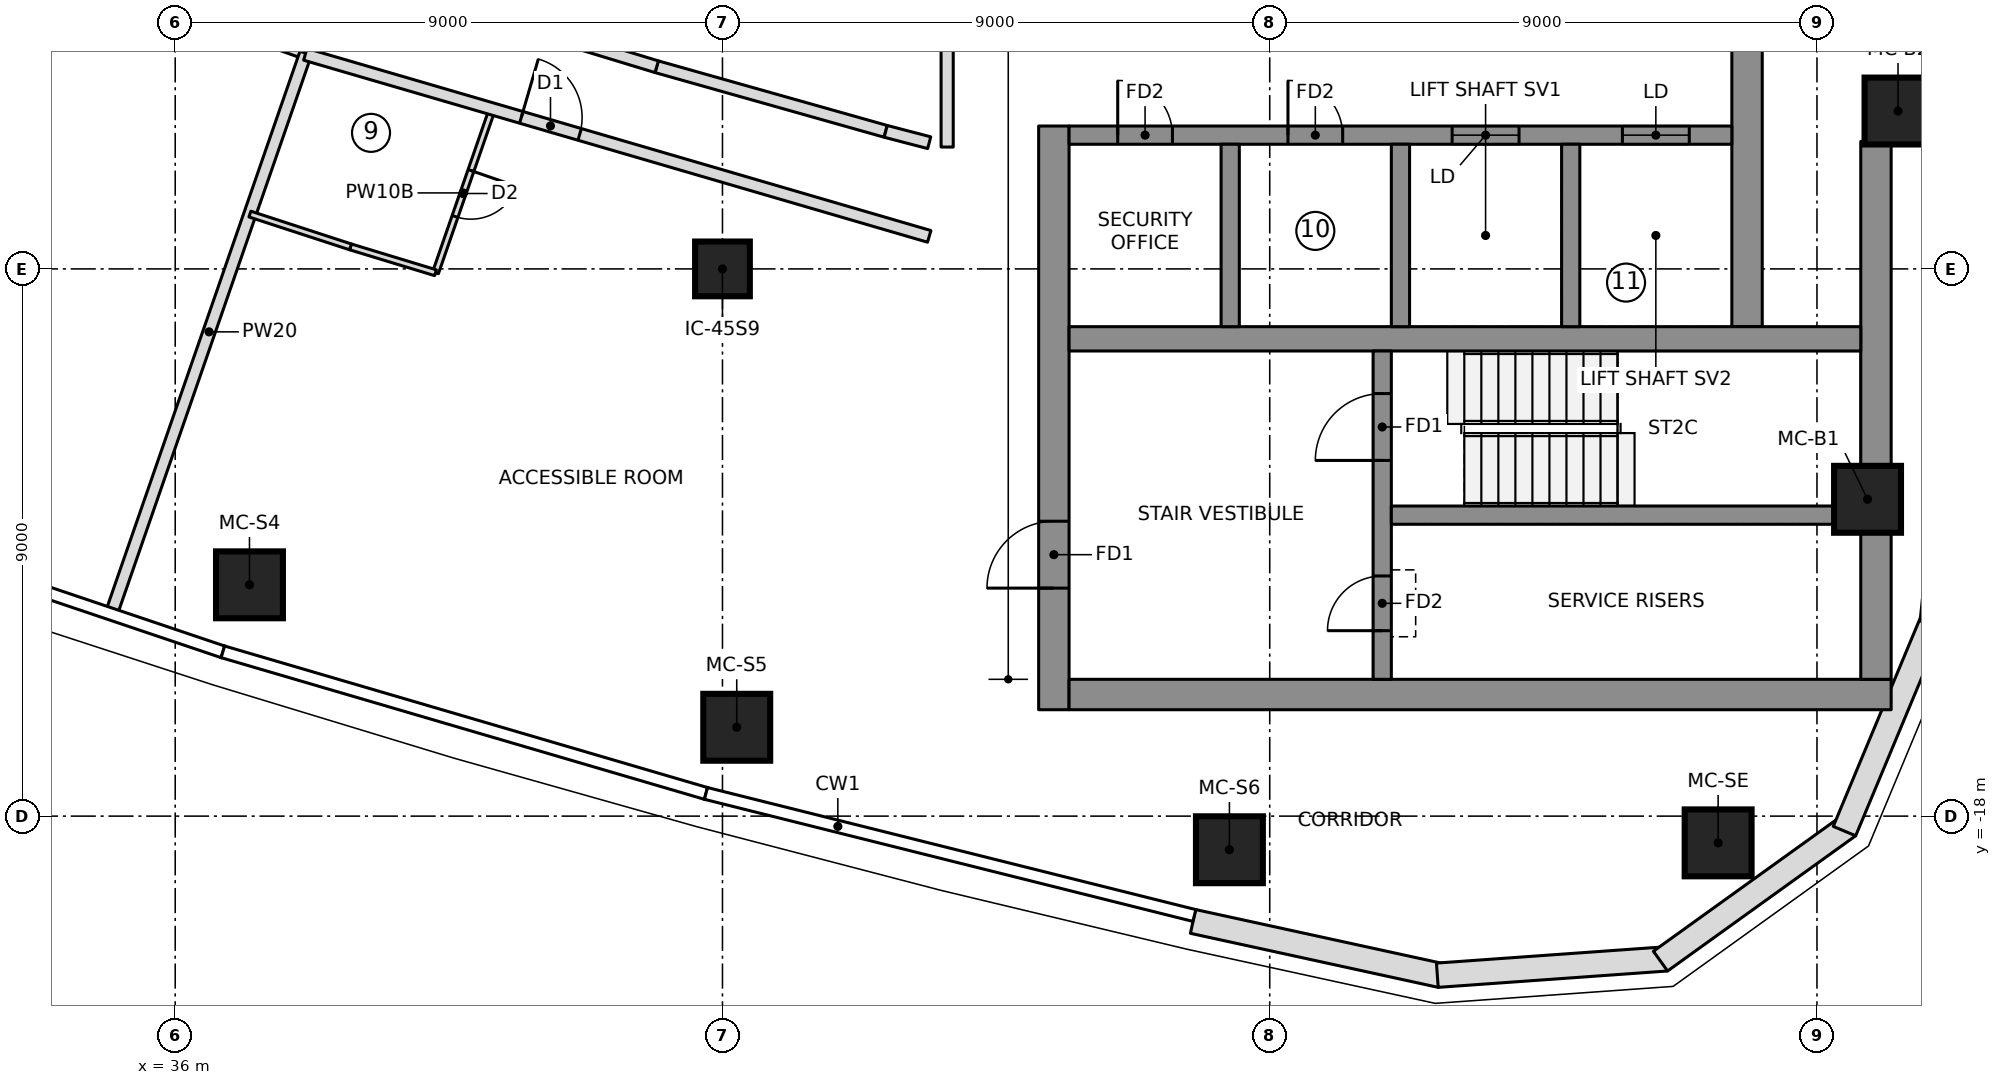
"""IFC4 building model, lengths in metres.
Left out: names, types, materials, properties, quantities, classifications, styles, units other than length and angle.
Written with IfcOpenShell. Run it as: python <this file> out.ifc"""

import sys

from ifc_helpers import new_model, si_unit, direction, frame, frame_2d, origin, origin_2d, place, context, subcontext, project, spatial, polyline, rectangle, outline, extrude, element, fill, save


model = new_model("IFC4")
c1 = context("Model", 3, precision=1e-05, world=origin(), true_north=direction((0.0, 1.0)))
c2 = subcontext(c1, "Body", "Model", "MODEL_VIEW")
j1 = project(units=[si_unit("LENGTHUNIT", "METRE"), si_unit("PLANEANGLEUNIT", "RADIAN")], contexts=[c1])
p1 = place(None, origin())
s1 = spatial("IfcSite", under=j1, at=p1, CompositionType="ELEMENT")
p2 = place(p1, origin())
s2 = spatial("IfcBuilding", under=s1, at=p2, CompositionType="ELEMENT")
p3 = place(p2, frame((0.0, 0.0, 278.55)))
s3 = spatial("IfcBuildingStorey", under=s2, at=p3, CompositionType="ELEMENT", Elevation=278.55)
p4 = place(p3, frame((50.45, -16.25, 0.0), z_axis=(0.0, 0.0, 1.0), x_axis=(0.0, 1.0, 0.0)))
e1 = element("IfcWall", 1, at=p4, inside=s3, PredefinedType="SHEAR", context=c2, shape_type="SweptSolid", body=[
    extrude(rectangle(XDim=9.6, YDim=0.5, at=frame_2d((4.8, 0.0))), origin(), (0.0, 0.0, 1.0), 3.55),
])
p5 = place(p4, frame((2.0, 0.0, 0.0)))
e2 = element("IfcOpeningElement", 2, at=p5, cuts=e1, PredefinedType="OPENING", context=c2, shape_type="SweptSolid", body=[
    extrude(rectangle(XDim=1.1, YDim=2.1, at=frame_2d((0.55, 1.05))), frame((0.0, 0.26, 0.0), z_axis=(0.0, -1.0, 0.0), x_axis=(1.0, 0.0, 0.0)), (0.0, 0.0, 1.0), 0.52),
])
p6 = place(p3, frame((50.7, -16.0, 0.0), z_axis=(0.0, 0.0, 1.0), x_axis=(1.0, 0.0, 0.0)))
e3 = element("IfcWall", 3, at=p6, inside=s3, PredefinedType="SHEAR", context=c2, shape_type="SweptSolid", body=[
    extrude(rectangle(XDim=13.52, YDim=0.5, at=frame_2d((6.76, 0.0))), origin(), (0.0, 0.0, 1.0), 3.55),
])
p7 = place(p3, frame((63.97, -15.75, 0.0), z_axis=(0.0, 0.0, 1.0), x_axis=(0.0, 1.0, 0.0)))
e4 = element("IfcWall", 4, at=p7, inside=s3, PredefinedType="SHEAR", context=c2, shape_type="SweptSolid", body=[
    extrude(rectangle(XDim=8.847, YDim=0.5, at=frame_2d((4.423, 0.0))), origin(), (0.0, 0.0, 1.0), 3.55),
])
p8 = place(p3, frame((61.85, -9.95, 0.0), z_axis=(0.0, 0.0, 1.0), x_axis=(0.0, 1.0, 0.0)))
e5 = element("IfcWall", 5, at=p8, inside=s3, PredefinedType="SHEAR", context=c2, shape_type="SweptSolid", body=[
    extrude(rectangle(XDim=19.9, YDim=0.5, at=frame_2d((9.95, 0.0))), origin(), (0.0, 0.0, 1.0), 3.55),
])
p9 = place(p3, frame((50.7, -10.15, 0.0), z_axis=(0.0, 0.0, 1.0), x_axis=(1.0, 0.0, 0.0)))
e6 = element("IfcWall", 6, at=p9, inside=s3, PredefinedType="SHEAR", context=c2, shape_type="SweptSolid", body=[
    extrude(rectangle(XDim=13.02, YDim=0.4, at=frame_2d((6.51, 0.0))), origin(), (0.0, 0.0, 1.0), 3.55),
])
p10 = place(p3, frame((50.7, -6.8, 0.0), z_axis=(0.0, 0.0, 1.0), x_axis=(1.0, 0.0, 0.0)))
e7 = element("IfcWall", 7, at=p10, inside=s3, PredefinedType="SHEAR", context=c2, shape_type="SweptSolid", body=[
    extrude(rectangle(XDim=10.9, YDim=0.3, at=frame_2d((5.45, 0.0))), origin(), (0.0, 0.0, 1.0), 3.55),
])
p11 = place(p10, frame((6.3, 0.0, 0.0)))
e8 = element("IfcOpeningElement", 8, at=p11, cuts=e7, PredefinedType="OPENING", context=c2, shape_type="SweptSolid", body=[
    extrude(rectangle(XDim=1.1, YDim=2.1, at=frame_2d((0.55, 1.05))), frame((0.0, 0.16, 0.0), z_axis=(0.0, -1.0, 0.0), x_axis=(1.0, 0.0, 0.0)), (0.0, 0.0, 1.0), 0.32),
])
p12 = place(p10, frame((9.1, 0.0, 0.0)))
e9 = element("IfcOpeningElement", 9, at=p12, cuts=e7, PredefinedType="OPENING", context=c2, shape_type="SweptSolid", body=[
    extrude(rectangle(XDim=1.1, YDim=2.1, at=frame_2d((0.55, 1.05))), frame((0.0, 0.16, 0.0), z_axis=(0.0, -1.0, 0.0), x_axis=(1.0, 0.0, 0.0)), (0.0, 0.0, 1.0), 0.32),
])
p13 = place(p10, frame((0.8, 0.0, 0.0)))
e10 = element("IfcOpeningElement", 10, at=p13, cuts=e7, PredefinedType="OPENING", context=c2, shape_type="SweptSolid", body=[
    extrude(rectangle(XDim=0.9, YDim=2.1, at=frame_2d((0.45, 1.05))), frame((0.0, 0.16, 0.0), z_axis=(0.0, -1.0, 0.0), x_axis=(1.0, 0.0, 0.0)), (0.0, 0.0, 1.0), 0.32),
])
p14 = place(p10, frame((3.6, 0.0, 0.0)))
e11 = element("IfcOpeningElement", 11, at=p14, cuts=e7, PredefinedType="OPENING", context=c2, shape_type="SweptSolid", body=[
    extrude(rectangle(XDim=0.9, YDim=2.1, at=frame_2d((0.45, 1.05))), frame((0.0, 0.16, 0.0), z_axis=(0.0, -1.0, 0.0), x_axis=(1.0, 0.0, 0.0)), (0.0, 0.0, 1.0), 0.32),
])
for number, where, z_axis, x_axis in (
    (12, (53.35, -9.95, 0.0), (0.0, 0.0, 1.0), (0.0, 1.0, 0.0)),
    (13, (56.15, -9.95, 0.0), (0.0, 0.0, 1.0), (0.0, 1.0, 0.0)),
    (14, (58.95, -9.95, 0.0), (0.0, 0.0, 1.0), (0.0, 1.0, 0.0)),
):
    element("IfcWall", number, at=place(p3, frame(where, z_axis=z_axis, x_axis=x_axis)), inside=s3, PredefinedType="SHEAR", context=c2, shape_type="SweptSolid", body=[
        extrude(rectangle(XDim=3.0, YDim=0.3, at=frame_2d((1.5, 0.0))), origin(), (0.0, 0.0, 1.0), 3.55),
    ])
p15 = place(p3, frame((55.85, -15.75, 0.0), z_axis=(0.0, 0.0, 1.0), x_axis=(0.0, 1.0, 0.0)))
e15 = element("IfcWall", 15, at=p15, inside=s3, PredefinedType="SHEAR", context=c2, shape_type="SweptSolid", body=[
    extrude(rectangle(XDim=5.4, YDim=0.3, at=frame_2d((2.7, 0.0))), origin(), (0.0, 0.0, 1.0), 3.55),
])
p16 = place(p15, frame((3.6, 0.0, 0.0)))
e16 = element("IfcOpeningElement", 16, at=p16, cuts=e15, PredefinedType="OPENING", context=c2, shape_type="SweptSolid", body=[
    extrude(rectangle(XDim=1.1, YDim=2.1, at=frame_2d((0.55, 1.05))), frame((0.0, 0.16, 0.0), z_axis=(0.0, -1.0, 0.0), x_axis=(1.0, 0.0, 0.0)), (0.0, 0.0, 1.0), 0.32),
])
p17 = place(p15, frame((0.8, 0.0, 0.0)))
e17 = element("IfcOpeningElement", 17, at=p17, cuts=e15, PredefinedType="OPENING", context=c2, shape_type="SweptSolid", body=[
    extrude(rectangle(XDim=0.9, YDim=2.1, at=frame_2d((0.45, 1.05))), frame((0.0, 0.16, 0.0), z_axis=(0.0, -1.0, 0.0), x_axis=(1.0, 0.0, 0.0)), (0.0, 0.0, 1.0), 0.32),
])
p18 = place(p3, frame((56.0, -13.05, 0.0), z_axis=(0.0, 0.0, 1.0), x_axis=(1.0, 0.0, 0.0)))
e18 = element("IfcWall", 18, at=p18, inside=s3, PredefinedType="SHEAR", context=c2, shape_type="SweptSolid", body=[
    extrude(rectangle(XDim=7.72, YDim=0.3, at=frame_2d((3.86, 0.0))), origin(), (0.0, 0.0, 1.0), 3.55),
])
for number, where, z_axis, x_axis in (
    (19, (37.221, -14.196, 0.0), (0.0, 0.0, 1.0), (1.0, 0.0, 0.0)),
    (20, (45.235, -16.539, 0.0), (0.0, 0.0, 1.0), (1.0, 0.0, 0.0)),
    (21, (53.337, -18.553, 0.0), (0.0, 0.0, 1.0), (1.0, 0.0, 0.0)),
    (22, (61.374, -18.44, 0.0), (0.0, 0.0, 1.0), (1.0, 0.0, 0.0)),
    (23, (63.832, -12.789, 0.0), (0.0, 0.0, 1.0), (1.0, 0.0, 0.0)),
    (24, (64.333, -6.403, 0.0), (0.0, 0.0, 1.0), (1.0, 0.0, 0.0)),
):
    element("IfcColumn", number, at=place(p3, frame(where, z_axis=z_axis, x_axis=x_axis)), inside=s3, PredefinedType="COLUMN", context=c2, shape_type="SweptSolid", body=[
        extrude(rectangle(XDim=1.1, YDim=1.1, at=origin_2d()), origin(), (0.0, 0.0, 1.0), 3.55),
    ])
p19 = place(p3, frame((45.0, -9.0, 0.0), z_axis=(0.0, 0.0, 1.0), x_axis=(1.0, 0.0, 0.0)))
e25 = element("IfcColumn", 25, at=p19, inside=s3, PredefinedType="COLUMN", context=c2, shape_type="SweptSolid", body=[
    extrude(rectangle(XDim=0.9, YDim=0.9, at=origin_2d()), origin(), (0.0, 0.0, 1.0), 3.55),
])
p20 = place(p3, frame((52.738, -19.732, 0.0), z_axis=(0.0, 0.0, 1.0), x_axis=(0.977020225348, -0.213146614471, 0.0)))
e26 = element("IfcWall", 26, at=p20, inside=s3, PredefinedType="NOTDEFINED", context=c2, shape_type="SweptSolid", body=[
    extrude(outline(polyline([(0.0, -0.2), (4.171, -0.2), (4.113, 0.2), (0.0, 0.2), (0.0, -0.2)])), origin(), (0.0, 0.0, 1.0), 3.25),
])
p21 = place(p3, frame((56.785, -20.615, 0.0), z_axis=(0.0, 0.0, 1.0), x_axis=(0.99746272096, 0.071190731806, 0.0)))
e27 = element("IfcWall", 27, at=p21, inside=s3, PredefinedType="NOTDEFINED", context=c2, shape_type="SweptSolid", body=[
    extrude(outline(polyline([(-0.029, -0.2), (3.753, -0.2), (3.64, 0.2), (0.029, 0.2), (-0.029, -0.2)])), origin(), (0.0, 0.0, 1.0), 3.25),
])
p22 = place(p3, frame((60.472, -20.352, 0.0), z_axis=(0.0, 0.0, 1.0), x_axis=(0.811962548682, 0.583709533533, 0.0)))
e28 = element("IfcWall", 28, at=p22, inside=s3, PredefinedType="NOTDEFINED", context=c2, shape_type="SweptSolid", body=[
    extrude(outline(polyline([(-0.057, -0.2), (3.753, -0.2), (3.64, 0.2), (0.057, 0.2), (-0.057, -0.2)])), origin(), (0.0, 0.0, 1.0), 3.25),
])
p23 = place(p3, frame((63.474, -18.194, 0.0), z_axis=(0.0, 0.0, 1.0), x_axis=(0.385285857918, 0.922797273343, 0.0)))
e29 = element("IfcWall", 29, at=p23, inside=s3, PredefinedType="NOTDEFINED", context=c2, shape_type="SweptSolid", body=[
    extrude(outline(polyline([(-0.057, -0.2), (3.726, -0.2), (3.667, 0.2), (0.057, 0.2), (-0.057, -0.2)])), origin(), (0.0, 0.0, 1.0), 3.25),
])
p24 = place(p3, frame((64.898, -14.782, 0.0), z_axis=(0.0, 0.0, 1.0), x_axis=(0.102249826987, 0.994758751096, 0.0)))
e30 = element("IfcWall", 30, at=p24, inside=s3, PredefinedType="NOTDEFINED", context=c2, shape_type="SweptSolid", body=[
    extrude(outline(polyline([(-0.03, -0.2), (4.237, -0.2), (4.23, 0.2), (0.03, 0.2), (-0.03, -0.2)])), origin(), (0.0, 0.0, 1.0), 3.25),
])
p25 = place(p3, frame((26.85, -1.423, 0.0), z_axis=(0.0, 0.0, 1.0), x_axis=(0.941868496397, -0.335981748753, 0.0)))
e31 = element("IfcWall", 31, at=p25, inside=s3, PredefinedType="PARTITIONING", context=c2, shape_type="SweptSolid", body=[
    extrude(rectangle(XDim=11.993, YDim=0.2, at=frame_2d((5.997, 0.0))), origin(), (0.0, 0.0, 1.0), 3.25),
])
p26 = place(p25, frame((3.05, 0.0, 0.0)))
e32 = element("IfcOpeningElement", 32, at=p26, cuts=e31, PredefinedType="OPENING", context=c2, shape_type="SweptSolid", body=[
    extrude(rectangle(XDim=1.0, YDim=2.1, at=frame_2d((0.5, 1.05))), frame((0.0, 0.11, 0.0), z_axis=(0.0, -1.0, 0.0), x_axis=(1.0, 0.0, 0.0)), (0.0, 0.0, 1.0), 0.22),
])
p27 = place(p3, frame((34.967, -14.618, 0.0), z_axis=(0.0, 0.0, 1.0), x_axis=(0.327725028322, 0.94477315045, 0.0)))
e33 = element("IfcWall", 33, at=p27, inside=s3, PredefinedType="PARTITIONING", context=c2, shape_type="SweptSolid", body=[
    extrude(rectangle(XDim=9.702, YDim=0.2, at=frame_2d((4.851, 0.0))), origin(), (0.0, 0.0, 1.0), 3.25),
])
p28 = place(p3, frame((41.192, -6.437, 0.0), z_axis=(0.0, 0.0, 1.0), x_axis=(-0.327695885805, -0.944783258968, 0.0)))
e34 = element("IfcWall", 34, at=p28, inside=s3, PredefinedType="PARTITIONING", context=c2, shape_type="SweptSolid", body=[
    extrude(rectangle(XDim=2.779, YDim=0.1, at=frame_2d((1.39, 0.0))), origin(), (0.0, 0.0, 1.0), 3.25),
])
p29 = place(p28, frame((1.0, 0.0, 0.0)))
e35 = element("IfcOpeningElement", 35, at=p29, cuts=e34, PredefinedType="OPENING", context=c2, shape_type="SweptSolid", body=[
    extrude(rectangle(XDim=0.8, YDim=2.1, at=frame_2d((0.4, 1.05))), frame((0.0, 0.06, 0.0), z_axis=(0.0, -1.0, 0.0), x_axis=(1.0, 0.0, 0.0)), (0.0, 0.0, 1.0), 0.12),
])
p30 = place(p3, frame((40.281, -9.063, 0.0), z_axis=(0.0, 0.0, 1.0), x_axis=(-0.956734544447, 0.290962216555, 0.0)))
e36 = element("IfcWall", 36, at=p30, inside=s3, PredefinedType="PARTITIONING", context=c2, shape_type="SweptSolid", body=[
    extrude(rectangle(XDim=1.462, YDim=0.1, at=frame_2d((0.731, 0.0))), origin(), (0.0, 0.0, 1.0), 3.25),
])
p31 = place(p3, frame((38.882, -8.638, 0.0), z_axis=(0.0, 0.0, 1.0), x_axis=(-0.950684866901, 0.31015848182, 0.0)))
e37 = element("IfcWall", 37, at=p31, inside=s3, PredefinedType="PARTITIONING", context=c2, shape_type="SweptSolid", body=[
    extrude(rectangle(XDim=1.74, YDim=0.1, at=frame_2d((0.87, 0.0))), origin(), (0.0, 0.0, 1.0), 3.25),
])
p32 = place(p3, frame((47.684, -6.738, 0.0), z_axis=(0.0, 0.0, 1.0), x_axis=(-0.962411212211, 0.271596499628, 0.0)))
e38 = element("IfcWall", 38, at=p32, inside=s3, PredefinedType="PARTITIONING", context=c2, shape_type="SweptSolid", body=[
    extrude(rectangle(XDim=3.913, YDim=0.2, at=frame_2d((1.957, 0.0))), origin(), (0.0, 0.0, 1.0), 3.25),
])
p33 = place(p3, frame((43.918, -5.675, 0.0), z_axis=(0.0, 0.0, 1.0), x_axis=(-0.956690508666, 0.291106974546, 0.0)))
e39 = element("IfcWall", 39, at=p33, inside=s3, PredefinedType="PARTITIONING", context=c2, shape_type="SweptSolid", body=[
    extrude(rectangle(XDim=1.245, YDim=0.2, at=frame_2d((0.622, 0.0))), origin(), (0.0, 0.0, 1.0), 3.25),
])
p34 = place(p3, frame((38.14, -5.471, 0.0), z_axis=(0.0, 0.0, 1.0), x_axis=(0.95996673497, -0.280114026339, 0.0)))
e40 = element("IfcWall", 40, at=p34, inside=s3, PredefinedType="PARTITIONING", context=c2, shape_type="SweptSolid", body=[
    extrude(rectangle(XDim=10.688, YDim=0.2, at=frame_2d((5.344, 0.0))), origin(), (0.0, 0.0, 1.0), 3.25),
])
p35 = place(p34, frame((3.7, 0.0, 0.0)))
e41 = element("IfcOpeningElement", 41, at=p35, cuts=e40, PredefinedType="OPENING", context=c2, shape_type="SweptSolid", body=[
    extrude(rectangle(XDim=1.0, YDim=2.1, at=frame_2d((0.5, 1.05))), frame((0.0, 0.11, 0.0), z_axis=(0.0, -1.0, 0.0), x_axis=(1.0, 0.0, 0.0)), (0.0, 0.0, 1.0), 0.22),
])
p36 = place(p3, frame((48.4, -6.924, 0.0), z_axis=(0.0, 0.0, 1.0), x_axis=(-0.967585713416, 0.252542842294, 0.0)))
e42 = element("IfcWall", 42, at=p36, inside=s3, PredefinedType="PARTITIONING", context=c2, shape_type="SweptSolid", body=[
    extrude(rectangle(XDim=0.74, YDim=0.2, at=frame_2d((0.37, 0.0))), origin(), (0.0, 0.0, 1.0), 3.25),
])
p37 = place(p3, frame((48.695, 6.996, 0.0), z_axis=(0.0, 0.0, 1.0), x_axis=(0.0, -1.0, 0.0)))
e43 = element("IfcWall", 43, at=p37, inside=s3, PredefinedType="PARTITIONING", context=c2, shape_type="SweptSolid", body=[
    extrude(rectangle(XDim=13.992, YDim=0.2, at=frame_2d((6.996, 0.0))), origin(), (0.0, 0.0, 1.0), 3.25),
])
p38 = place(p29, origin())
e44 = element("IfcDoor", 44, at=p38, inside=s3, OperationType="SINGLE_SWING_LEFT", PredefinedType="DOOR", context=c2, shape_type="SweptSolid", body=[
    extrude(rectangle(XDim=0.8, YDim=2.1, at=frame_2d((0.4, 1.05))), frame((0.0, 0.025, 0.0), z_axis=(0.0, -1.0, 0.0), x_axis=(1.0, 0.0, 0.0)), (0.0, 0.0, 1.0), 0.05),
])
fill(e35, e44)
p39 = place(p35, origin())
e45 = element("IfcDoor", 45, at=p39, inside=s3, OperationType="SINGLE_SWING_LEFT", PredefinedType="DOOR", context=c2, shape_type="SweptSolid", body=[
    extrude(rectangle(XDim=1.0, YDim=2.1, at=frame_2d((0.5, 1.05))), frame((0.0, 0.025, 0.0), z_axis=(0.0, -1.0, 0.0), x_axis=(1.0, 0.0, 0.0)), (0.0, 0.0, 1.0), 0.05),
])
fill(e41, e45)
p40 = place(p11, origin())
e46 = element("IfcDoor", 46, at=p40, inside=s3, OperationType="DOUBLE_DOOR_SLIDING", PredefinedType="DOOR", context=c2, shape_type="SweptSolid", body=[
    extrude(rectangle(XDim=1.1, YDim=2.1, at=frame_2d((0.55, 1.05))), frame((0.0, 0.025, 0.0), z_axis=(0.0, -1.0, 0.0), x_axis=(1.0, 0.0, 0.0)), (0.0, 0.0, 1.0), 0.05),
])
fill(e8, e46)
p41 = place(p12, origin())
e47 = element("IfcDoor", 47, at=p41, inside=s3, OperationType="DOUBLE_DOOR_SLIDING", PredefinedType="DOOR", context=c2, shape_type="SweptSolid", body=[
    extrude(rectangle(XDim=1.1, YDim=2.1, at=frame_2d((0.55, 1.05))), frame((0.0, 0.025, 0.0), z_axis=(0.0, -1.0, 0.0), x_axis=(1.0, 0.0, 0.0)), (0.0, 0.0, 1.0), 0.05),
])
fill(e9, e47)
p42 = place(p16, origin())
e48 = element("IfcDoor", 48, at=p42, inside=s3, OperationType="SINGLE_SWING_RIGHT", PredefinedType="DOOR", context=c2, shape_type="SweptSolid", body=[
    extrude(rectangle(XDim=1.1, YDim=2.1, at=frame_2d((0.55, 1.05))), frame((0.0, 0.025, 0.0), z_axis=(0.0, -1.0, 0.0), x_axis=(1.0, 0.0, 0.0)), (0.0, 0.0, 1.0), 0.05),
])
fill(e16, e48)
p43 = place(p5, origin())
e49 = element("IfcDoor", 49, at=p43, inside=s3, OperationType="SINGLE_SWING_RIGHT", PredefinedType="DOOR", context=c2, shape_type="SweptSolid", body=[
    extrude(rectangle(XDim=1.1, YDim=2.1, at=frame_2d((0.55, 1.05))), frame((0.0, 0.025, 0.0), z_axis=(0.0, -1.0, 0.0), x_axis=(1.0, 0.0, 0.0)), (0.0, 0.0, 1.0), 0.05),
])
fill(e2, e49)
p44 = place(p17, origin())
e50 = element("IfcDoor", 50, at=p44, inside=s3, OperationType="SINGLE_SWING_LEFT", PredefinedType="DOOR", context=c2, shape_type="SweptSolid", body=[
    extrude(rectangle(XDim=0.9, YDim=2.1, at=frame_2d((0.45, 1.05))), frame((0.0, 0.025, 0.0), z_axis=(0.0, -1.0, 0.0), x_axis=(1.0, 0.0, 0.0)), (0.0, 0.0, 1.0), 0.05),
])
fill(e17, e50)
p45 = place(p13, origin())
e51 = element("IfcDoor", 51, at=p45, inside=s3, OperationType="SINGLE_SWING_LEFT", PredefinedType="DOOR", context=c2, shape_type="SweptSolid", body=[
    extrude(rectangle(XDim=0.9, YDim=2.1, at=frame_2d((0.45, 1.05))), frame((0.0, 0.025, 0.0), z_axis=(0.0, -1.0, 0.0), x_axis=(1.0, 0.0, 0.0)), (0.0, 0.0, 1.0), 0.05),
])
fill(e10, e51)
p46 = place(p14, origin())
e52 = element("IfcDoor", 52, at=p46, inside=s3, OperationType="SINGLE_SWING_LEFT", PredefinedType="DOOR", context=c2, shape_type="SweptSolid", body=[
    extrude(rectangle(XDim=0.9, YDim=2.1, at=frame_2d((0.45, 1.05))), frame((0.0, 0.025, 0.0), z_axis=(0.0, -1.0, 0.0), x_axis=(1.0, 0.0, 0.0)), (0.0, 0.0, 1.0), 0.05),
])
fill(e11, e52)
save(model, sys.argv[1])
